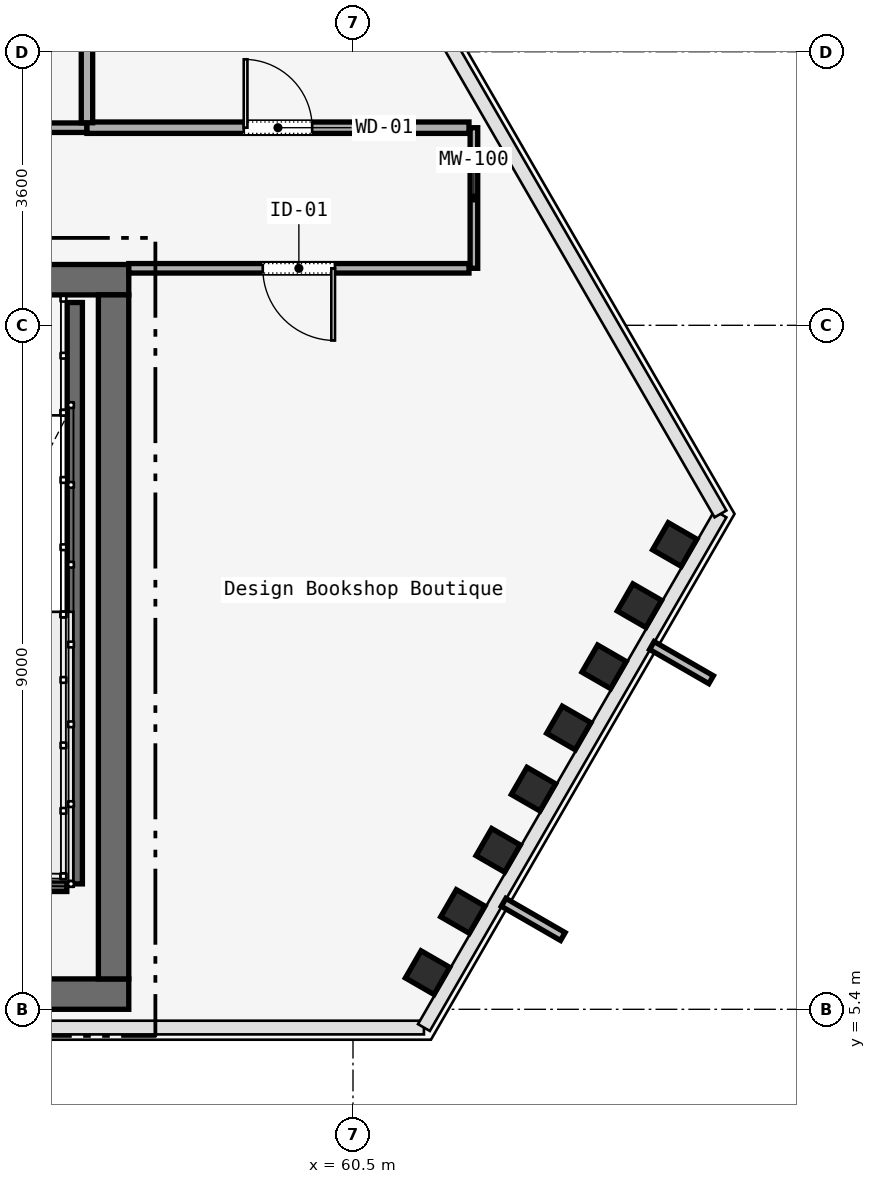
"""IFC4 building model, lengths in metres.
Left out: names, types, materials, properties, quantities, classifications, styles, units other than length and angle.
Written with IfcOpenShell. Run it as: python <this file> out.ifc"""

import sys

from ifc_helpers import new_model, si_unit, direction, frame, frame_2d, origin, origin_2d, place, context, subcontext, project, spatial, rectangle, i_section, extrude, element, fill, save


model = new_model("IFC4")
c1 = context("Model", 3, precision=1e-05, world=origin(), true_north=direction((0.0, 1.0)))
c2 = subcontext(c1, "Body", "Model", "MODEL_VIEW")
j1 = project(units=[si_unit("LENGTHUNIT", "METRE"), si_unit("PLANEANGLEUNIT", "RADIAN")], contexts=[c1])
p1 = place(None, origin())
s1 = spatial("IfcSite", under=j1, at=p1, CompositionType="ELEMENT")
p2 = place(p1, origin())
s2 = spatial("IfcBuilding", under=s1, at=p2, CompositionType="ELEMENT")
p3 = place(p2, frame((0.0, 0.0, 218.0)))
s3 = spatial("IfcBuildingStorey", under=s2, at=p3, CompositionType="ELEMENT", Elevation=218.0)
p4 = place(p3, frame((26.45, 15.0, 0.0), z_axis=(0.0, 0.0, 1.0), x_axis=(1.0, 0.0, 0.0)))
e1 = element("IfcWall", 1, at=p4, inside=s3, PredefinedType="SOLIDWALL", context=c2, shape_type="SweptSolid", body=[
    extrude(rectangle(XDim=31.1, YDim=0.4, at=frame_2d((15.55, 0.0))), origin(), (0.0, 0.0, 1.0), 3.58),
])
p5 = place(p4, frame((1.65, 0.0, 0.0)))
e2 = element("IfcOpeningElement", 2, at=p5, cuts=e1, PredefinedType="OPENING", context=c2, shape_type="SweptSolid", body=[
    extrude(rectangle(XDim=1.1, YDim=2.2, at=frame_2d((0.55, 1.1))), frame((0.0, 0.2, 0.0), z_axis=(0.0, -1.0, 0.0), x_axis=(1.0, 0.0, 0.0)), (0.0, 0.0, 1.0), 0.4),
])
p6 = place(p4, frame((13.65, 0.0, 0.0)))
e3 = element("IfcOpeningElement", 3, at=p6, cuts=e1, PredefinedType="OPENING", context=c2, shape_type="SweptSolid", body=[
    extrude(rectangle(XDim=1.1, YDim=2.2, at=frame_2d((0.55, 1.1))), frame((0.0, 0.2, 0.0), z_axis=(0.0, -1.0, 0.0), x_axis=(1.0, 0.0, 0.0)), (0.0, 0.0, 1.0), 0.4),
])
p7 = place(p4, frame((25.55, 0.0, 0.0)))
e4 = element("IfcOpeningElement", 4, at=p7, cuts=e1, PredefinedType="OPENING", context=c2, shape_type="SweptSolid", body=[
    extrude(rectangle(XDim=1.1, YDim=2.2, at=frame_2d((0.55, 1.1))), frame((0.0, 0.2, 0.0), z_axis=(0.0, -1.0, 0.0), x_axis=(1.0, 0.0, 0.0)), (0.0, 0.0, 1.0), 0.4),
])
p8 = place(p4, frame((19.35, 0.0, 0.0)))
e5 = element("IfcOpeningElement", 5, at=p8, cuts=e1, PredefinedType="OPENING", context=c2, shape_type="SweptSolid", body=[
    extrude(rectangle(XDim=1.1, YDim=2.2, at=frame_2d((0.55, 1.1))), frame((0.0, 0.2, 0.0), z_axis=(0.0, -1.0, 0.0), x_axis=(1.0, 0.0, 0.0)), (0.0, 0.0, 1.0), 0.4),
])
p9 = place(p4, frame((21.4, 0.0, 0.0)))
e6 = element("IfcOpeningElement", 6, at=p9, cuts=e1, PredefinedType="OPENING", context=c2, shape_type="SweptSolid", body=[
    extrude(rectangle(XDim=0.9, YDim=2.1, at=frame_2d((0.45, 1.05))), frame((0.0, 0.2, 0.0), z_axis=(0.0, -1.0, 0.0), x_axis=(1.0, 0.0, 0.0)), (0.0, 0.0, 1.0), 0.4),
])
p10 = place(p4, frame((5.14, 0.0, 0.0)))
e7 = element("IfcOpeningElement", 7, at=p10, cuts=e1, PredefinedType="OPENING", context=c2, shape_type="SweptSolid", body=[
    extrude(rectangle(XDim=0.95, YDim=2.2, at=frame_2d((0.475, 1.1))), frame((0.0, 0.2, 0.0), z_axis=(0.0, -1.0, 0.0), x_axis=(1.0, 0.0, 0.0)), (0.0, 0.0, 1.0), 0.4),
])
p11 = place(p4, frame((7.825, 0.0, 0.0)))
e8 = element("IfcOpeningElement", 8, at=p11, cuts=e1, PredefinedType="OPENING", context=c2, shape_type="SweptSolid", body=[
    extrude(rectangle(XDim=0.95, YDim=2.2, at=frame_2d((0.475, 1.1))), frame((0.0, 0.2, 0.0), z_axis=(0.0, -1.0, 0.0), x_axis=(1.0, 0.0, 0.0)), (0.0, 0.0, 1.0), 0.4),
])
p12 = place(p4, frame((10.46, 0.0, 0.0)))
e9 = element("IfcOpeningElement", 9, at=p12, cuts=e1, PredefinedType="OPENING", context=c2, shape_type="SweptSolid", body=[
    extrude(rectangle(XDim=0.95, YDim=2.2, at=frame_2d((0.475, 1.1))), frame((0.0, 0.2, 0.0), z_axis=(0.0, -1.0, 0.0), x_axis=(1.0, 0.0, 0.0)), (0.0, 0.0, 1.0), 0.4),
])
p13 = place(p4, frame((23.35, 0.0, 0.0)))
e10 = element("IfcOpeningElement", 10, at=p13, cuts=e1, PredefinedType="OPENING", context=c2, shape_type="SweptSolid", body=[
    extrude(rectangle(XDim=1.3, YDim=2.3, at=frame_2d((0.65, 1.15))), frame((0.0, 0.2, 0.0), z_axis=(0.0, -1.0, 0.0), x_axis=(1.0, 0.0, 0.0)), (0.0, 0.0, 1.0), 0.4),
])
p14 = place(p3, frame((26.45, 5.6, 0.0), z_axis=(0.0, 0.0, 1.0), x_axis=(1.0, 0.0, 0.0)))
e11 = element("IfcWall", 11, at=p14, inside=s3, PredefinedType="SOLIDWALL", context=c2, shape_type="SweptSolid", body=[
    extrude(rectangle(XDim=31.1, YDim=0.4, at=frame_2d((15.55, 0.0))), origin(), (0.0, 0.0, 1.0), 3.58),
])
p15 = place(p3, frame((57.35, 5.8, 0.0), z_axis=(0.0, 0.0, 1.0), x_axis=(0.0, 1.0, 0.0)))
e12 = element("IfcWall", 12, at=p15, inside=s3, PredefinedType="SOLIDWALL", context=c2, shape_type="SweptSolid", body=[
    extrude(rectangle(XDim=9.0, YDim=0.4, at=frame_2d((4.5, 0.0))), origin(), (0.0, 0.0, 1.0), 3.58),
])
for number, where, z_axis, x_axis in (
    (13, (61.481, 5.882, 0.0), (0.0, 0.0, 1.0), (0.5, 0.866, 0.0)),
    (14, (61.946, 6.687, 0.0), (0.0, 0.0, 1.0), (0.5, 0.866, 0.0)),
    (15, (62.41, 7.492, 0.0), (0.0, 0.0, 1.0), (0.5, 0.866, 0.0)),
    (16, (62.875, 8.297, 0.0), (0.0, 0.0, 1.0), (0.5, 0.866, 0.0)),
    (17, (63.339, 9.102, 0.0), (0.0, 0.0, 1.0), (0.5, 0.866, 0.0)),
    (18, (63.804, 9.906, 0.0), (0.0, 0.0, 1.0), (0.5, 0.866, 0.0)),
    (19, (64.269, 10.711, 0.0), (0.0, 0.0, 1.0), (0.5, 0.866, 0.0)),
    (20, (64.733, 11.516, 0.0), (0.0, 0.0, 1.0), (0.5, 0.866, 0.0)),
):
    element("IfcColumn", number, at=place(p3, frame(where, z_axis=z_axis, x_axis=x_axis)), inside=s3, PredefinedType="COLUMN", context=c2, shape_type="SweptSolid", body=[
        extrude(i_section(OverallWidth=0.412, OverallDepth=0.435, WebThickness=0.036, FlangeThickness=0.044, FilletRadius=0.015, at=origin_2d()), origin(), (0.0, 0.0, 1.0), 3.58),
    ])
p16 = place(p3, frame((56.84, 14.7, 0.0), z_axis=(0.0, 0.0, 1.0), x_axis=(0.0, -1.0, 0.0)))
e21 = element("IfcWall", 21, at=p16, inside=s3, PredefinedType="SOLIDWALL", context=c2, shape_type="SweptSolid", body=[
    extrude(rectangle(XDim=7.65, YDim=0.2, at=frame_2d((3.825, 0.0))), origin(), (0.0, 0.0, 1.0), 3.8),
])
p17 = place(p3, frame((53.62, 7.05, 0.0), z_axis=(0.0, 0.0, 1.0), x_axis=(1.0, 0.0, 0.0)))
e22 = element("IfcWall", 22, at=p17, inside=s3, PredefinedType="SOLIDWALL", context=c2, shape_type="SweptSolid", body=[
    extrude(rectangle(XDim=3.115, YDim=0.2, at=frame_2d((1.558, 0.0))), origin(), (0.0, 0.0, 1.0), 3.8),
])
p18 = place(p3, frame((62.091, 17.0, 0.0), z_axis=(0.0, 0.0, 1.0), x_axis=(0.0, -1.0, 0.0)))
e23 = element("IfcWall", 23, at=p18, inside=s3, PredefinedType="MOVABLE", context=c2, shape_type="SweptSolid", body=[
    extrude(rectangle(XDim=1.85, YDim=0.1, at=frame_2d((0.925, 0.0))), origin(), (0.0, 0.0, 1.0), 3.01),
])
p19 = place(p3, frame((62.026, 15.15, 0.0), z_axis=(0.0, 0.0, 1.0), x_axis=(-1.0, 0.0, 0.0)))
e24 = element("IfcWall", 24, at=p19, inside=s3, PredefinedType="PARTITIONING", context=c2, shape_type="SweptSolid", body=[
    extrude(rectangle(XDim=4.476, YDim=0.125, at=frame_2d((2.238, 0.0))), origin(), (0.0, 0.0, 1.0), 3.01),
])
p20 = place(p19, frame((1.763, 0.0, 0.0)))
e25 = element("IfcOpeningElement", 25, at=p20, cuts=e24, PredefinedType="OPENING", context=c2, shape_type="SweptSolid", body=[
    extrude(rectangle(XDim=0.95, YDim=2.2, at=frame_2d((0.475, 1.1))), frame((0.0, 0.062, 0.0), z_axis=(0.0, -1.0, 0.0), x_axis=(1.0, 0.0, 0.0)), (0.0, 0.0, 1.0), 0.125),
])
p21 = place(p3, frame((51.8, 17.0, 0.0), z_axis=(0.0, 0.0, 1.0), x_axis=(1.0, 0.0, 0.0)))
e26 = element("IfcWall", 26, at=p21, inside=s3, PredefinedType="PARTITIONING", context=c2, shape_type="SweptSolid", body=[
    extrude(rectangle(XDim=5.2, YDim=0.125, at=frame_2d((2.6, 0.0))), origin(), (0.0, 0.0, 1.0), 3.01),
])
p22 = place(p21, frame((2.125, 0.0, 0.0)))
e27 = element("IfcOpeningElement", 27, at=p22, cuts=e26, PredefinedType="OPENING", context=c2, shape_type="SweptSolid", body=[
    extrude(rectangle(XDim=0.95, YDim=2.2, at=frame_2d((0.475, 1.1))), frame((0.0, 0.062, 0.0), z_axis=(0.0, -1.0, 0.0), x_axis=(1.0, 0.0, 0.0)), (0.0, 0.0, 1.0), 0.125),
])
p23 = place(p3, frame((57.0, 17.0, 0.0), z_axis=(0.0, 0.0, 1.0), x_axis=(1.0, 0.0, 0.0)))
e28 = element("IfcWall", 28, at=p23, inside=s3, PredefinedType="PARTITIONING", context=c2, shape_type="SweptSolid", body=[
    extrude(rectangle(XDim=5.026, YDim=0.15, at=frame_2d((2.513, 0.0))), origin(), (0.0, 0.0, 1.0), 3.01),
])
p24 = place(p23, frame((2.063, 0.0, 0.0)))
e29 = element("IfcOpeningElement", 29, at=p24, cuts=e28, PredefinedType="OPENING", context=c2, shape_type="SweptSolid", body=[
    extrude(rectangle(XDim=0.9, YDim=2.15, at=frame_2d((0.45, 1.075))), frame((0.0, 0.075, 0.0), z_axis=(0.0, -1.0, 0.0), x_axis=(1.0, 0.0, 0.0)), (0.0, 0.0, 1.0), 0.15),
])
p25 = place(p3, frame((57.0, 17.065, 0.0), z_axis=(0.0, 0.0, 1.0), x_axis=(0.0, 1.0, 0.0)))
e30 = element("IfcWall", 30, at=p25, inside=s3, PredefinedType="PARTITIONING", context=c2, shape_type="SweptSolid", body=[
    extrude(rectangle(XDim=9.135, YDim=0.15, at=frame_2d((4.567, 0.0))), origin(), (0.0, 0.0, 1.0), 3.01),
])
p26 = place(p20, origin())
e31 = element("IfcDoor", 31, at=p26, inside=s3, OperationType="SINGLE_SWING_RIGHT", PredefinedType="DOOR", context=c2, shape_type="SweptSolid", body=[
    extrude(rectangle(XDim=0.95, YDim=2.2, at=frame_2d((0.475, 1.1))), frame((0.0, 0.025, 0.0), z_axis=(0.0, -1.0, 0.0), x_axis=(1.0, 0.0, 0.0)), (0.0, 0.0, 1.0), 0.05),
])
fill(e25, e31)
p27 = place(p24, origin())
e32 = element("IfcDoor", 32, at=p27, inside=s3, OperationType="SINGLE_SWING_LEFT", PredefinedType="DOOR", context=c2, shape_type="SweptSolid", body=[
    extrude(rectangle(XDim=0.9, YDim=2.15, at=frame_2d((0.45, 1.075))), frame((0.0, 0.025, 0.0), z_axis=(0.0, -1.0, 0.0), x_axis=(1.0, 0.0, 0.0)), (0.0, 0.0, 1.0), 0.05),
])
fill(e29, e32)
save(model, sys.argv[1])
